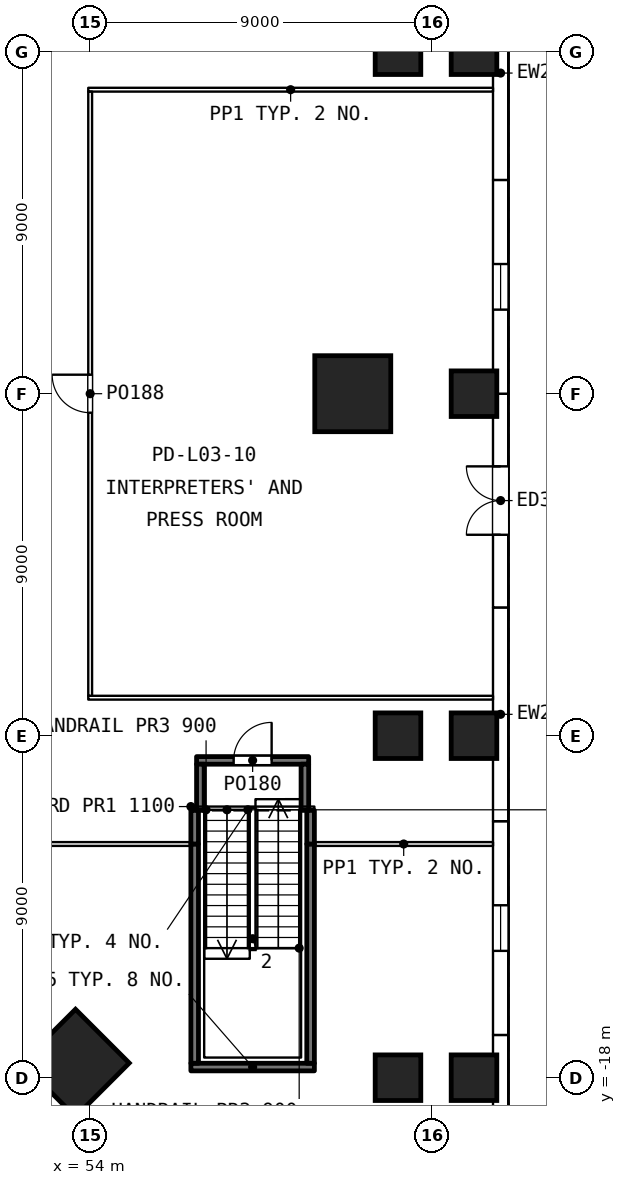
"""IFC4 building model, lengths in metres.
Left out: names, types, materials, properties, quantities, classifications, styles, units other than length and angle.
Written with IfcOpenShell. Run it as: python <this file> out.ifc"""

import sys

from ifc_helpers import new_model, si_unit, direction, frame, frame_2d, origin, origin_2d, place, context, subcontext, project, spatial, rectangle, extrude, element, fill, save


model = new_model("IFC4")
c1 = context("Model", 3, precision=1e-05, world=origin(), true_north=direction((0.0, 1.0)))
c2 = subcontext(c1, "Body", "Model", "MODEL_VIEW")
j1 = project(units=[si_unit("LENGTHUNIT", "METRE"), si_unit("PLANEANGLEUNIT", "RADIAN")], contexts=[c1])
p1 = place(None, origin())
s1 = spatial("IfcSite", under=j1, at=p1, CompositionType="ELEMENT")
p2 = place(p1, origin())
s2 = spatial("IfcBuilding", under=s1, at=p2, CompositionType="ELEMENT")
p3 = place(p2, frame((0.0, 0.0, 18.0)))
s3 = spatial("IfcBuildingStorey", under=s2, at=p3, CompositionType="ELEMENT", Elevation=18.0)
for number, where, z_axis, x_axis in (
    (1, (62.1, -18.0, 0.0), (0.0, 0.0, 1.0), (1.0, 0.0, 0.0)),
    (2, (62.1, -9.0, 0.0), (0.0, 0.0, 1.0), (1.0, 0.0, 0.0)),
    (3, (62.1, 9.0, 0.0), (0.0, 0.0, 1.0), (1.0, 0.0, 0.0)),
    (4, (64.1, -18.0, 0.0), (0.0, 0.0, 1.0), (1.0, 0.0, 0.0)),
    (5, (64.1, -9.0, 0.0), (0.0, 0.0, 1.0), (1.0, 0.0, 0.0)),
    (6, (64.1, 0.0, 0.0), (0.0, 0.0, 1.0), (1.0, 0.0, 0.0)),
    (7, (64.1, 9.0, 0.0), (0.0, 0.0, 1.0), (1.0, 0.0, 0.0)),
):
    element("IfcColumn", number, at=place(p3, frame(where, z_axis=z_axis, x_axis=x_axis)), inside=s3, PredefinedType="COLUMN", context=c2, shape_type="SweptSolid", body=[
        extrude(rectangle(XDim=1.2, YDim=1.2, at=origin_2d()), origin(), (0.0, 0.0, 1.0), 4.8),
    ])
for number, where, z_axis, x_axis in (
    (8, (60.91, 0.0, 0.0), (0.0, 0.0, 1.0), (1.0, 0.0, 0.0)),
    (9, (53.614, -17.614, 0.0), (0.0, 0.0, 1.0), (0.707, -0.707, 0.0)),
):
    element("IfcColumn", number, at=place(p3, frame(where, z_axis=z_axis, x_axis=x_axis)), inside=s3, PredefinedType="COLUMN", context=c2, shape_type="SweptSolid", body=[
        extrude(rectangle(XDim=2.0, YDim=2.0, at=origin_2d()), origin(), (0.0, 0.0, 1.0), 4.8),
    ])
p4 = place(p3, frame((64.8, -22.5, 0.0), z_axis=(0.0, 0.0, 1.0), x_axis=(0.0, 1.0, 0.0)))
e10 = element("IfcWall", 10, at=p4, inside=s3, PredefinedType="SOLIDWALL", context=c2, shape_type="SweptSolid", body=[
    extrude(rectangle(XDim=5.625, YDim=0.4, at=frame_2d((2.812, 0.0))), origin(), (0.0, 0.0, 1.0), 4.5),
])
p5 = place(p4, frame((2.212, 0.0, 1.1)))
e11 = element("IfcOpeningElement", 11, at=p5, cuts=e10, PredefinedType="OPENING", context=c2, shape_type="SweptSolid", body=[
    extrude(rectangle(XDim=1.2, YDim=1.8, at=frame_2d((0.6, 0.9))), frame((0.0, 0.21, 0.0), z_axis=(0.0, -1.0, 0.0), x_axis=(1.0, 0.0, 0.0)), (0.0, 0.0, 1.0), 0.42),
])
p6 = place(p3, frame((64.8, -16.875, 0.0), z_axis=(0.0, 0.0, 1.0), x_axis=(0.0, 1.0, 0.0)))
e12 = element("IfcWall", 12, at=p6, inside=s3, PredefinedType="SOLIDWALL", context=c2, shape_type="SweptSolid", body=[
    extrude(rectangle(XDim=5.625, YDim=0.4, at=frame_2d((2.812, 0.0))), origin(), (0.0, 0.0, 1.0), 4.5),
])
p7 = place(p6, frame((2.212, 0.0, 1.1)))
e13 = element("IfcOpeningElement", 13, at=p7, cuts=e12, PredefinedType="OPENING", context=c2, shape_type="SweptSolid", body=[
    extrude(rectangle(XDim=1.2, YDim=1.8, at=frame_2d((0.6, 0.9))), frame((0.0, 0.21, 0.0), z_axis=(0.0, -1.0, 0.0), x_axis=(1.0, 0.0, 0.0)), (0.0, 0.0, 1.0), 0.42),
])
p8 = place(p3, frame((64.8, -11.25, 0.0), z_axis=(0.0, 0.0, 1.0), x_axis=(0.0, 1.0, 0.0)))
e14 = element("IfcWall", 14, at=p8, inside=s3, PredefinedType="SOLIDWALL", context=c2, shape_type="SweptSolid", body=[
    extrude(rectangle(XDim=5.625, YDim=0.4, at=frame_2d((2.812, 0.0))), origin(), (0.0, 0.0, 1.0), 4.5),
])
p9 = place(p3, frame((64.8, -5.625, 0.0), z_axis=(0.0, 0.0, 1.0), x_axis=(0.0, 1.0, 0.0)))
e15 = element("IfcWall", 15, at=p9, inside=s3, PredefinedType="SOLIDWALL", context=c2, shape_type="SweptSolid", body=[
    extrude(rectangle(XDim=5.625, YDim=0.4, at=frame_2d((2.812, 0.0))), origin(), (0.0, 0.0, 1.0), 4.5),
])
p10 = place(p9, frame((1.913, 0.0, 0.0)))
e16 = element("IfcOpeningElement", 16, at=p10, cuts=e15, PredefinedType="OPENING", context=c2, shape_type="SweptSolid", body=[
    extrude(rectangle(XDim=1.8, YDim=2.4, at=frame_2d((0.9, 1.2))), frame((0.0, 0.21, 0.0), z_axis=(0.0, -1.0, 0.0), x_axis=(1.0, 0.0, 0.0)), (0.0, 0.0, 1.0), 0.42),
])
p11 = place(p3, frame((64.8, 0.0, 0.0), z_axis=(0.0, 0.0, 1.0), x_axis=(0.0, 1.0, 0.0)))
e17 = element("IfcWall", 17, at=p11, inside=s3, PredefinedType="SOLIDWALL", context=c2, shape_type="SweptSolid", body=[
    extrude(rectangle(XDim=5.625, YDim=0.4, at=frame_2d((2.812, 0.0))), origin(), (0.0, 0.0, 1.0), 4.5),
])
p12 = place(p11, frame((2.212, 0.0, 1.1)))
e18 = element("IfcOpeningElement", 18, at=p12, cuts=e17, PredefinedType="OPENING", context=c2, shape_type="SweptSolid", body=[
    extrude(rectangle(XDim=1.2, YDim=1.8, at=frame_2d((0.6, 0.9))), frame((0.0, 0.21, 0.0), z_axis=(0.0, -1.0, 0.0), x_axis=(1.0, 0.0, 0.0)), (0.0, 0.0, 1.0), 0.42),
])
p13 = place(p3, frame((64.8, 5.625, 0.0), z_axis=(0.0, 0.0, 1.0), x_axis=(0.0, 1.0, 0.0)))
e19 = element("IfcWall", 19, at=p13, inside=s3, PredefinedType="SOLIDWALL", context=c2, shape_type="SweptSolid", body=[
    extrude(rectangle(XDim=5.625, YDim=0.4, at=frame_2d((2.812, 0.0))), origin(), (0.0, 0.0, 1.0), 4.5),
])
p14 = place(p3, frame((56.65, -17.72, 0.0), z_axis=(0.0, 0.0, 1.0), x_axis=(1.0, 0.0, 0.0)))
e20 = element("IfcWall", 20, at=p14, inside=s3, PredefinedType="SOLIDWALL", context=c2, shape_type="SweptSolid", body=[
    extrude(rectangle(XDim=3.25, YDim=0.2, at=frame_2d((1.625, 0.0))), origin(), (0.0, 0.0, 1.0), 4.5),
])
for number, where, z_axis, x_axis in (
    (21, (56.75, -17.62, 0.0), (0.0, 0.0, 1.0), (0.0, 1.0, 0.0)),
    (22, (59.8, -17.62, 0.0), (0.0, 0.0, 1.0), (0.0, 1.0, 0.0)),
):
    element("IfcWall", number, at=place(p3, frame(where, z_axis=z_axis, x_axis=x_axis)), inside=s3, PredefinedType="SOLIDWALL", context=c2, shape_type="SweptSolid", body=[
        extrude(rectangle(XDim=5.77, YDim=0.2, at=frame_2d((2.885, 0.0))), origin(), (0.0, 0.0, 1.0), 4.5),
    ])
p15 = place(p3, frame((56.8, -9.65, 0.0), z_axis=(0.0, 0.0, 1.0), x_axis=(1.0, 0.0, 0.0)))
e23 = element("IfcWall", 23, at=p15, inside=s3, PredefinedType="SOLIDWALL", context=c2, shape_type="SweptSolid", body=[
    extrude(rectangle(XDim=2.95, YDim=0.2, at=frame_2d((1.475, 0.0))), origin(), (0.0, 0.0, 1.0), 4.5),
])
p16 = place(p15, frame((0.975, 0.0, 0.0)))
e24 = element("IfcOpeningElement", 24, at=p16, cuts=e23, PredefinedType="OPENING", context=c2, shape_type="SweptSolid", body=[
    extrude(rectangle(XDim=1.0, YDim=2.1, at=frame_2d((0.5, 1.05))), frame((0.0, 0.11, 0.0), z_axis=(0.0, -1.0, 0.0), x_axis=(1.0, 0.0, 0.0)), (0.0, 0.0, 1.0), 0.22),
])
p17 = place(p3, frame((56.75, -11.85, 0.0), z_axis=(0.0, 0.0, 1.0), x_axis=(0.0, 1.0, 0.0)))
e25 = element("IfcWall", 25, at=p17, inside=s3, PredefinedType="SOLIDWALL", context=c2, shape_type="SweptSolid", body=[
    extrude(rectangle(XDim=0.885, YDim=0.2, at=frame_2d((0.442, 0.0))), origin(), (0.0, 0.0, 1.0), 4.5),
])
for number, where, z_axis, x_axis in (
    (26, (56.9, -10.965, 0.0), (0.0, 0.0, 1.0), (0.0, 1.0, 0.0)),
    (27, (59.65, -10.965, 0.0), (0.0, 0.0, 1.0), (0.0, 1.0, 0.0)),
):
    element("IfcWall", number, at=place(p3, frame(where, z_axis=z_axis, x_axis=x_axis)), inside=s3, PredefinedType="SOLIDWALL", context=c2, shape_type="SweptSolid", body=[
        extrude(rectangle(XDim=1.215, YDim=0.2, at=frame_2d((0.607, 0.0))), origin(), (0.0, 0.0, 1.0), 4.5),
    ])
p18 = place(p3, frame((59.8, -11.85, 0.0), z_axis=(0.0, 0.0, 1.0), x_axis=(0.0, 1.0, 0.0)))
e28 = element("IfcWall", 28, at=p18, inside=s3, PredefinedType="SOLIDWALL", context=c2, shape_type="SweptSolid", body=[
    extrude(rectangle(XDim=0.885, YDim=0.2, at=frame_2d((0.442, 0.0))), origin(), (0.0, 0.0, 1.0), 4.5),
])
p19 = place(p3, frame((37.585, -11.85, 0.0), z_axis=(0.0, 0.0, 1.0), x_axis=(1.0, 0.0, 0.0)))
e29 = element("IfcWall", 29, at=p19, inside=s3, PredefinedType="PARTITIONING", context=c2, shape_type="SweptSolid", body=[
    extrude(rectangle(XDim=19.065, YDim=0.1, at=frame_2d((9.532, 0.0))), origin(), (0.0, 0.0, 1.0), 4.5),
])
p20 = place(p19, frame((9.032, 0.0, 0.0)))
e30 = element("IfcOpeningElement", 30, at=p20, cuts=e29, PredefinedType="OPENING", context=c2, shape_type="SweptSolid", body=[
    extrude(rectangle(XDim=1.0, YDim=2.1, at=frame_2d((0.5, 1.05))), frame((0.0, 0.06, 0.0), z_axis=(0.0, -1.0, 0.0), x_axis=(1.0, 0.0, 0.0)), (0.0, 0.0, 1.0), 0.12),
])
p21 = place(p3, frame((59.9, -11.85, 0.0), z_axis=(0.0, 0.0, 1.0), x_axis=(1.0, 0.0, 0.0)))
e31 = element("IfcWall", 31, at=p21, inside=s3, PredefinedType="PARTITIONING", context=c2, shape_type="SweptSolid", body=[
    extrude(rectangle(XDim=4.7, YDim=0.1, at=frame_2d((2.35, 0.0))), origin(), (0.0, 0.0, 1.0), 4.5),
])
for number, where, z_axis, x_axis in (
    (32, (53.95, -8.0, 0.0), (0.0, 0.0, 1.0), (1.0, 0.0, 0.0)),
    (33, (53.95, 8.0, 0.0), (0.0, 0.0, 1.0), (1.0, 0.0, 0.0)),
):
    element("IfcWall", number, at=place(p3, frame(where, z_axis=z_axis, x_axis=x_axis)), inside=s3, PredefinedType="PARTITIONING", context=c2, shape_type="SweptSolid", body=[
        extrude(rectangle(XDim=10.65, YDim=0.1, at=frame_2d((5.325, 0.0))), origin(), (0.0, 0.0, 1.0), 4.5),
    ])
p22 = place(p3, frame((54.0, -7.95, 0.0), z_axis=(0.0, 0.0, 1.0), x_axis=(0.0, 1.0, 0.0)))
e34 = element("IfcWall", 34, at=p22, inside=s3, PredefinedType="PARTITIONING", context=c2, shape_type="SweptSolid", body=[
    extrude(rectangle(XDim=15.9, YDim=0.1, at=frame_2d((7.95, 0.0))), origin(), (0.0, 0.0, 1.0), 4.5),
])
p23 = place(p22, frame((7.45, 0.0, 0.0)))
e35 = element("IfcOpeningElement", 35, at=p23, cuts=e34, PredefinedType="OPENING", context=c2, shape_type="SweptSolid", body=[
    extrude(rectangle(XDim=1.0, YDim=2.1, at=frame_2d((0.5, 1.05))), frame((0.0, 0.06, 0.0), z_axis=(0.0, -1.0, 0.0), x_axis=(1.0, 0.0, 0.0)), (0.0, 0.0, 1.0), 0.12),
])
p24 = place(p7, origin())
e36 = element("IfcWindow", 36, at=p24, inside=s3, PartitioningType="SINGLE_PANEL", PredefinedType="WINDOW", context=c2, shape_type="SweptSolid", body=[
    extrude(rectangle(XDim=1.2, YDim=1.8, at=frame_2d((0.6, 0.9))), frame((0.0, 0.03, 0.0), z_axis=(0.0, -1.0, 0.0), x_axis=(1.0, 0.0, 0.0)), (0.0, 0.0, 1.0), 0.06),
])
fill(e13, e36)
p25 = place(p10, origin())
e37 = element("IfcDoor", 37, at=p25, inside=s3, OperationType="SINGLE_SWING_LEFT", PredefinedType="DOOR", context=c2, shape_type="SweptSolid", body=[
    extrude(rectangle(XDim=1.8, YDim=2.4, at=frame_2d((0.9, 1.2))), frame((0.0, 0.025, 0.0), z_axis=(0.0, -1.0, 0.0), x_axis=(1.0, 0.0, 0.0)), (0.0, 0.0, 1.0), 0.05),
])
fill(e16, e37)
p26 = place(p12, origin())
e38 = element("IfcWindow", 38, at=p26, inside=s3, PartitioningType="SINGLE_PANEL", PredefinedType="WINDOW", context=c2, shape_type="SweptSolid", body=[
    extrude(rectangle(XDim=1.2, YDim=1.8, at=frame_2d((0.6, 0.9))), frame((0.0, 0.03, 0.0), z_axis=(0.0, -1.0, 0.0), x_axis=(1.0, 0.0, 0.0)), (0.0, 0.0, 1.0), 0.06),
])
fill(e18, e38)
p27 = place(p16, origin())
e39 = element("IfcDoor", 39, at=p27, inside=s3, OperationType="SINGLE_SWING_RIGHT", PredefinedType="DOOR", context=c2, shape_type="SweptSolid", body=[
    extrude(rectangle(XDim=1.0, YDim=2.1, at=frame_2d((0.5, 1.05))), frame((0.0, 0.025, 0.0), z_axis=(0.0, -1.0, 0.0), x_axis=(1.0, 0.0, 0.0)), (0.0, 0.0, 1.0), 0.05),
])
fill(e24, e39)
p28 = place(p23, origin())
e40 = element("IfcDoor", 40, at=p28, inside=s3, OperationType="SINGLE_SWING_RIGHT", PredefinedType="DOOR", context=c2, shape_type="SweptSolid", body=[
    extrude(rectangle(XDim=1.0, YDim=2.1, at=frame_2d((0.5, 1.05))), frame((0.0, 0.025, 0.0), z_axis=(0.0, -1.0, 0.0), x_axis=(1.0, 0.0, 0.0)), (0.0, 0.0, 1.0), 0.05),
])
fill(e35, e40)
save(model, sys.argv[1])
